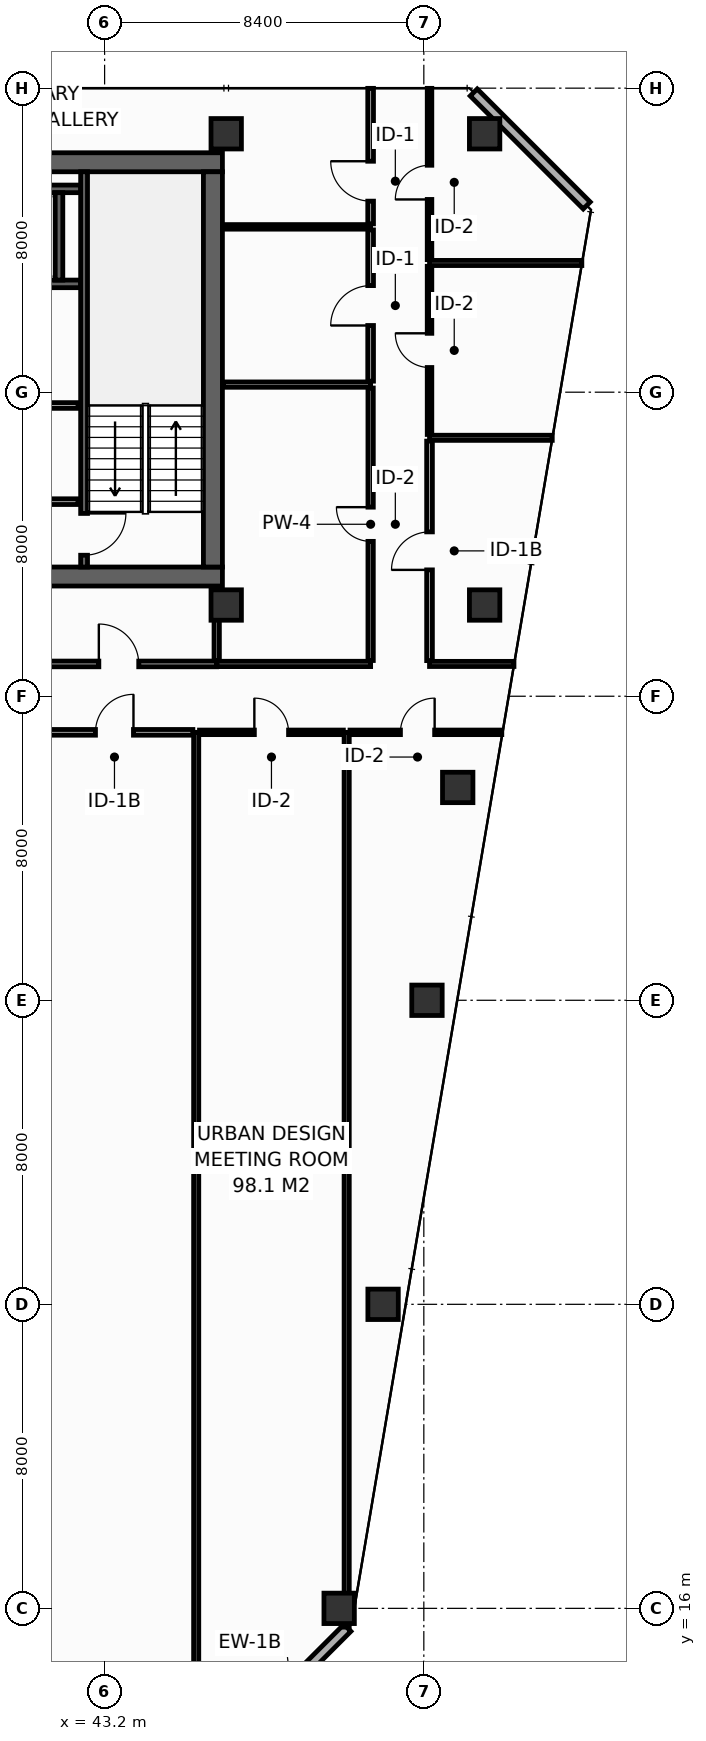
"""IFC4 building model, lengths in metres.
Left out: names, types, materials, properties, quantities, classifications, styles, units other than length and angle.
Written with IfcOpenShell. Run it as: python <this file> out.ifc"""

import sys

from ifc_helpers import new_model, si_unit, direction, frame, frame_2d, origin, origin_2d, place, context, subcontext, project, spatial, rectangle, hollow_rectangle, extrude, element, fill, save


model = new_model("IFC4")
c1 = context("Model", 3, precision=1e-05, world=origin(), true_north=direction((0.0, 1.0)))
c2 = subcontext(c1, "Body", "Model", "MODEL_VIEW")
j1 = project(units=[si_unit("LENGTHUNIT", "METRE"), si_unit("PLANEANGLEUNIT", "RADIAN")], contexts=[c1])
p1 = place(None, origin())
s1 = spatial("IfcSite", under=j1, at=p1, CompositionType="ELEMENT")
p2 = place(p1, origin())
s2 = spatial("IfcBuilding", under=s1, at=p2, CompositionType="ELEMENT")
p3 = place(p2, frame((0.0, 0.0, 201.8)))
s3 = spatial("IfcBuildingStorey", under=s2, at=p3, CompositionType="ELEMENT", Elevation=201.8)
p4 = place(p3, frame((13.6, 43.15, 0.0), z_axis=(0.0, 0.0, 1.0), x_axis=(1.0, 0.0, 0.0)))
e1 = element("IfcWall", 1, at=p4, inside=s3, PredefinedType="SHEAR", context=c2, shape_type="SweptSolid", body=[
    extrude(rectangle(XDim=32.7, YDim=0.5, at=frame_2d((16.35, 0.0))), origin(), (0.0, 0.0, 1.0), 3.55),
])
p5 = place(p4, frame((5.4, 0.0, 0.0)))
e2 = element("IfcOpeningElement", 2, at=p5, cuts=e1, PredefinedType="OPENING", context=c2, shape_type="SweptSolid", body=[
    extrude(rectangle(XDim=1.1, YDim=2.15, at=frame_2d((0.55, 1.075))), frame((0.0, 0.26, 0.0), z_axis=(0.0, -1.0, 0.0), x_axis=(1.0, 0.0, 0.0)), (0.0, 0.0, 1.0), 0.52),
])
p6 = place(p4, frame((25.6, 0.0, 0.0)))
e3 = element("IfcOpeningElement", 3, at=p6, cuts=e1, PredefinedType="OPENING", context=c2, shape_type="SweptSolid", body=[
    extrude(rectangle(XDim=1.1, YDim=2.15, at=frame_2d((0.55, 1.075))), frame((0.0, 0.26, 0.0), z_axis=(0.0, -1.0, 0.0), x_axis=(1.0, 0.0, 0.0)), (0.0, 0.0, 1.0), 0.52),
])
p7 = place(p3, frame((13.6, 54.05, 0.0), z_axis=(0.0, 0.0, 1.0), x_axis=(1.0, 0.0, 0.0)))
e4 = element("IfcWall", 4, at=p7, inside=s3, PredefinedType="SHEAR", context=c2, shape_type="SweptSolid", body=[
    extrude(rectangle(XDim=32.7, YDim=0.5, at=frame_2d((16.35, 0.0))), origin(), (0.0, 0.0, 1.0), 3.55),
])
p8 = place(p3, frame((46.05, 43.4, 0.0), z_axis=(0.0, 0.0, 1.0), x_axis=(0.0, 1.0, 0.0)))
e5 = element("IfcWall", 5, at=p8, inside=s3, PredefinedType="SHEAR", context=c2, shape_type="SweptSolid", body=[
    extrude(rectangle(XDim=10.4, YDim=0.5, at=frame_2d((5.2, 0.0))), origin(), (0.0, 0.0, 1.0), 3.55),
])
for number, where, z_axis, x_axis in (
    (6, (46.4, 54.8, 0.0), (0.0, 0.0, 1.0), (1.0, 0.0, 0.0)),
    (7, (53.2, 54.8, 0.0), (0.0, 0.0, 1.0), (1.0, 0.0, 0.0)),
    (8, (46.4, 42.4, 0.0), (0.0, 0.0, 1.0), (1.0, 0.0, 0.0)),
    (9, (53.2, 42.4, 0.0), (0.0, 0.0, 1.0), (1.0, 0.0, 0.0)),
    (10, (49.372, 16.0, 0.0), (0.0, 0.0, 1.0), (1.0, 0.0, 0.0)),
    (11, (50.528, 24.0, 0.0), (0.0, 0.0, 1.0), (1.0, 0.0, 0.0)),
    (12, (51.683, 32.0, 0.0), (0.0, 0.0, 1.0), (1.0, 0.0, 0.0)),
    (13, (52.492, 37.6, 0.0), (0.0, 0.0, 1.0), (1.0, 0.0, 0.0)),
):
    element("IfcColumn", number, at=place(p3, frame(where, z_axis=z_axis, x_axis=x_axis)), inside=s3, PredefinedType="COLUMN", context=c2, shape_type="SweptSolid", body=[
        extrude(hollow_rectangle(XDim=0.8, YDim=0.8, WallThickness=0.036, at=origin_2d()), origin(), (0.0, 0.0, 1.0), 3.8),
    ])
for number, where, z_axis, x_axis in (
    (14, (39.525, 50.85, 0.0), (0.0, 0.0, 1.0), (1.0, 0.0, 0.0)),
    (15, (39.525, 53.35, 0.0), (0.0, 0.0, 1.0), (1.0, 0.0, 0.0)),
):
    element("IfcWall", number, at=place(p3, frame(where, z_axis=z_axis, x_axis=x_axis)), inside=s3, PredefinedType="SHEAR", context=c2, shape_type="SweptSolid", body=[
        extrude(rectangle(XDim=3.045, YDim=0.2, at=frame_2d((1.522, 0.0))), origin(), (0.0, 0.0, 1.0), 3.55),
    ])
p9 = place(p3, frame((42.0, 50.95, 0.0), z_axis=(0.0, 0.0, 1.0), x_axis=(0.0, 1.0, 0.0)))
e16 = element("IfcWall", 16, at=p9, inside=s3, PredefinedType="SHEAR", context=c2, shape_type="SweptSolid", body=[
    extrude(rectangle(XDim=2.3, YDim=0.2, at=frame_2d((1.15, 0.0))), origin(), (0.0, 0.0, 1.0), 3.55),
])
p10 = place(p3, frame((42.66, 53.8, 0.0), z_axis=(0.0, 0.0, 1.0), x_axis=(0.0, -1.0, 0.0)))
e17 = element("IfcWall", 17, at=p10, inside=s3, PredefinedType="SHEAR", context=c2, shape_type="SweptSolid", body=[
    extrude(rectangle(XDim=10.4, YDim=0.18, at=frame_2d((5.2, 0.0))), origin(), (0.0, 0.0, 1.0), 3.55),
])
p11 = place(p10, frame((8.99, 0.0, 0.0)))
e18 = element("IfcOpeningElement", 18, at=p11, cuts=e17, PredefinedType="OPENING", context=c2, shape_type="SweptSolid", body=[
    extrude(rectangle(XDim=1.1, YDim=2.15, at=frame_2d((0.55, 1.075))), frame((0.0, 0.1, 0.0), z_axis=(0.0, -1.0, 0.0), x_axis=(1.0, 0.0, 0.0)), (0.0, 0.0, 1.0), 0.2),
])
p12 = place(p3, frame((33.95, 45.12, 0.0), z_axis=(0.0, 0.0, 1.0), x_axis=(1.0, 0.0, 0.0)))
e19 = element("IfcWall", 19, at=p12, inside=s3, PredefinedType="PARTITIONING", context=c2, shape_type="SweptSolid", body=[
    extrude(rectangle(XDim=8.55, YDim=0.15, at=frame_2d((4.275, 0.0))), origin(), (0.0, 0.0, 1.0), 3.55),
])
p13 = place(p12, frame((0.95, 0.0, 0.0)))
e20 = element("IfcOpeningElement", 20, at=p13, cuts=e19, PredefinedType="OPENING", context=c2, shape_type="SweptSolid", body=[
    extrude(rectangle(XDim=0.95, YDim=2.15, at=frame_2d((0.475, 1.075))), frame((0.0, 0.085, 0.0), z_axis=(0.0, -1.0, 0.0), x_axis=(1.0, 0.0, 0.0)), (0.0, 0.0, 1.0), 0.17),
])
p14 = place(p12, frame((3.8, 0.0, 0.0)))
e21 = element("IfcOpeningElement", 21, at=p14, cuts=e19, PredefinedType="OPENING", context=c2, shape_type="SweptSolid", body=[
    extrude(rectangle(XDim=0.95, YDim=2.15, at=frame_2d((0.475, 1.075))), frame((0.0, 0.085, 0.0), z_axis=(0.0, -1.0, 0.0), x_axis=(1.0, 0.0, 0.0)), (0.0, 0.0, 1.0), 0.17),
])
p15 = place(p12, frame((6.65, 0.0, 0.0)))
e22 = element("IfcOpeningElement", 22, at=p15, cuts=e19, PredefinedType="OPENING", context=c2, shape_type="SweptSolid", body=[
    extrude(rectangle(XDim=0.95, YDim=2.15, at=frame_2d((0.475, 1.075))), frame((0.0, 0.085, 0.0), z_axis=(0.0, -1.0, 0.0), x_axis=(1.0, 0.0, 0.0)), (0.0, 0.0, 1.0), 0.17),
])
p16 = place(p3, frame((33.95, 47.65, 0.0), z_axis=(0.0, 0.0, 1.0), x_axis=(1.0, 0.0, 0.0)))
e23 = element("IfcWall", 23, at=p16, inside=s3, PredefinedType="PARTITIONING", context=c2, shape_type="SweptSolid", body=[
    extrude(rectangle(XDim=8.55, YDim=0.15, at=frame_2d((4.275, 0.0))), origin(), (0.0, 0.0, 1.0), 3.55),
])
p17 = place(p3, frame((46.615, 12.513, 0.0), z_axis=(0.0, 0.0, 1.0), x_axis=(0.707135806771, 0.70707775441, 0.0)))
e24 = element("IfcWall", 24, at=p17, inside=s3, PredefinedType="STANDARD", context=c2, shape_type="SweptSolid", body=[
    extrude(rectangle(XDim=4.206, YDim=0.26, at=frame_2d((2.103, 0.0))), origin(), (0.0, 0.0, 1.0), 3.55),
])
p18 = place(p3, frame((55.887, 52.913, 0.0), z_axis=(0.0, 0.0, 1.0), x_axis=(-0.707106781187, 0.707106781187, 0.0)))
e25 = element("IfcWall", 25, at=p18, inside=s3, PredefinedType="STANDARD", context=c2, shape_type="SweptSolid", body=[
    extrude(rectangle(XDim=4.206, YDim=0.26, at=frame_2d((2.103, 0.0))), origin(), (0.0, 0.0, 1.0), 3.55),
])
p19 = place(p3, frame((46.15, 40.85, 0.0), z_axis=(0.0, 0.0, 1.0), x_axis=(1.0, 0.0, 0.0)))
e26 = element("IfcWall", 26, at=p19, inside=s3, PredefinedType="PARTITIONING", context=c2, shape_type="SweptSolid", body=[
    extrude(rectangle(XDim=4.05, YDim=0.14, at=frame_2d((2.025, 0.0))), origin(), (0.0, 0.0, 1.0), 3.55),
])
p20 = place(p3, frame((46.15, 40.94, 0.0), z_axis=(0.0, 0.0, 1.0), x_axis=(0.0, 1.0, 0.0)))
e27 = element("IfcWall", 27, at=p20, inside=s3, PredefinedType="PARTITIONING", context=c2, shape_type="SweptSolid", body=[
    extrude(rectangle(XDim=1.94, YDim=0.14, at=frame_2d((0.97, 0.0))), origin(), (0.0, 0.0, 1.0), 3.55),
])
p21 = place(p3, frame((46.32, 48.2, 0.0), z_axis=(0.0, 0.0, 1.0), x_axis=(1.0, 0.0, 0.0)))
e28 = element("IfcWall", 28, at=p21, inside=s3, PredefinedType="PARTITIONING", context=c2, shape_type="SweptSolid", body=[
    extrude(rectangle(XDim=3.88, YDim=0.14, at=frame_2d((1.94, 0.0))), origin(), (0.0, 0.0, 1.0), 3.55),
])
p22 = place(p3, frame((50.2, 40.94, 0.0), z_axis=(0.0, 0.0, 1.0), x_axis=(0.0, 1.0, 0.0)))
e29 = element("IfcWall", 29, at=p22, inside=s3, PredefinedType="PARTITIONING", context=c2, shape_type="SweptSolid", body=[
    extrude(rectangle(XDim=7.17, YDim=0.14, at=frame_2d((3.585, 0.0))), origin(), (0.0, 0.0, 1.0), 2.835),
])
p23 = place(p22, frame((3.135, 0.0, 0.0)))
e30 = element("IfcOpeningElement", 30, at=p23, cuts=e29, PredefinedType="OPENING", context=c2, shape_type="SweptSolid", body=[
    extrude(rectangle(XDim=0.9, YDim=2.1, at=frame_2d((0.45, 1.05))), frame((0.0, 0.08, 0.0), z_axis=(0.0, -1.0, 0.0), x_axis=(1.0, 0.0, 0.0)), (0.0, 0.0, 1.0), 0.16),
])
p24 = place(p3, frame((46.32, 52.35, 0.0), z_axis=(0.0, 0.0, 1.0), x_axis=(1.0, 0.0, 0.0)))
e31 = element("IfcWall", 31, at=p24, inside=s3, PredefinedType="PARTITIONING", context=c2, shape_type="SweptSolid", body=[
    extrude(rectangle(XDim=3.88, YDim=0.12, at=frame_2d((1.94, 0.0))), origin(), (0.0, 0.0, 1.0), 3.55),
])
p25 = place(p3, frame((50.2, 48.29, 0.0), z_axis=(0.0, 0.0, 1.0), x_axis=(0.0, 1.0, 0.0)))
e32 = element("IfcWall", 32, at=p25, inside=s3, PredefinedType="PARTITIONING", context=c2, shape_type="SweptSolid", body=[
    extrude(rectangle(XDim=3.98, YDim=0.15, at=frame_2d((1.99, 0.0))), origin(), (0.0, 0.0, 1.0), 3.55),
])
p26 = place(p25, frame((1.465, 0.0, 0.0)))
e33 = element("IfcOpeningElement", 33, at=p26, cuts=e32, PredefinedType="OPENING", context=c2, shape_type="SweptSolid", body=[
    extrude(rectangle(XDim=1.05, YDim=2.15, at=frame_2d((0.525, 1.075))), frame((0.0, 0.085, 0.0), z_axis=(0.0, -1.0, 0.0), x_axis=(1.0, 0.0, 0.0)), (0.0, 0.0, 1.0), 0.17),
])
p27 = place(p3, frame((50.2, 52.43, 0.0), z_axis=(0.0, 0.0, 1.0), x_axis=(0.0, 1.0, 0.0)))
e34 = element("IfcWall", 34, at=p27, inside=s3, PredefinedType="PARTITIONING", context=c2, shape_type="SweptSolid", body=[
    extrude(rectangle(XDim=3.565, YDim=0.15, at=frame_2d((1.783, 0.0))), origin(), (0.0, 0.0, 1.0), 2.935),
])
p28 = place(p27, frame((0.597, 0.0, 0.0)))
e35 = element("IfcOpeningElement", 35, at=p28, cuts=e34, PredefinedType="OPENING", context=c2, shape_type="SweptSolid", body=[
    extrude(rectangle(XDim=1.05, YDim=2.15, at=frame_2d((0.525, 1.075))), frame((0.0, 0.085, 0.0), z_axis=(0.0, -1.0, 0.0), x_axis=(1.0, 0.0, 0.0)), (0.0, 0.0, 1.0), 0.17),
])
p29 = place(p3, frame((51.75, 40.85, 0.0), z_axis=(0.0, 0.0, 1.0), x_axis=(1.0, 0.0, 0.0)))
e36 = element("IfcWall", 36, at=p29, inside=s3, PredefinedType="PARTITIONING", context=c2, shape_type="SweptSolid", body=[
    extrude(rectangle(XDim=2.222, YDim=0.135, at=frame_2d((1.111, 0.0))), origin(), (0.0, 0.0, 1.0), 3.035),
])
p30 = place(p3, frame((51.75, 46.8, 0.0), z_axis=(0.0, 0.0, 1.0), x_axis=(1.0, 0.0, 0.0)))
e37 = element("IfcWall", 37, at=p30, inside=s3, PredefinedType="PARTITIONING", context=c2, shape_type="SweptSolid", body=[
    extrude(rectangle(XDim=3.229, YDim=0.135, at=frame_2d((1.615, 0.0))), origin(), (0.0, 0.0, 1.0), 2.835),
])
p31 = place(p3, frame((51.75, 51.4, 0.0), z_axis=(0.0, 0.0, 1.0), x_axis=(1.0, 0.0, 0.0)))
e38 = element("IfcWall", 38, at=p31, inside=s3, PredefinedType="PARTITIONING", context=c2, shape_type="SweptSolid", body=[
    extrude(rectangle(XDim=4.008, YDim=0.135, at=frame_2d((2.004, 0.0))), origin(), (0.0, 0.0, 1.0), 2.835),
])
p32 = place(p3, frame((51.75, 40.938, 0.0), z_axis=(0.0, 0.0, 1.0), x_axis=(0.0, 1.0, 0.0)))
e39 = element("IfcWall", 39, at=p32, inside=s3, PredefinedType="PARTITIONING", context=c2, shape_type="SweptSolid", body=[
    extrude(rectangle(XDim=5.775, YDim=0.15, at=frame_2d((2.887, 0.0))), origin(), (0.0, 0.0, 1.0), 2.835),
])
p33 = place(p32, frame((2.387, 0.0, 0.0)))
e40 = element("IfcOpeningElement", 40, at=p33, cuts=e39, PredefinedType="OPENING", context=c2, shape_type="SweptSolid", body=[
    extrude(rectangle(XDim=1.0, YDim=2.15, at=frame_2d((0.5, 1.075))), frame((0.0, 0.085, 0.0), z_axis=(0.0, -1.0, 0.0), x_axis=(1.0, 0.0, 0.0)), (0.0, 0.0, 1.0), 0.17),
])
p34 = place(p3, frame((51.75, 46.887, 0.0), z_axis=(0.0, 0.0, 1.0), x_axis=(0.0, 1.0, 0.0)))
e41 = element("IfcWall", 41, at=p34, inside=s3, PredefinedType="PARTITIONING", context=c2, shape_type="SweptSolid", body=[
    extrude(rectangle(XDim=4.425, YDim=0.12, at=frame_2d((2.212, 0.0))), origin(), (0.0, 0.0, 1.0), 3.55),
])
p35 = place(p34, frame((1.762, 0.0, 0.0)))
e42 = element("IfcOpeningElement", 42, at=p35, cuts=e41, PredefinedType="OPENING", context=c2, shape_type="SweptSolid", body=[
    extrude(rectangle(XDim=0.9, YDim=2.1, at=frame_2d((0.45, 1.05))), frame((0.0, 0.07, 0.0), z_axis=(0.0, -1.0, 0.0), x_axis=(1.0, 0.0, 0.0)), (0.0, 0.0, 1.0), 0.14),
])
p36 = place(p3, frame((51.75, 51.488, 0.0), z_axis=(0.0, 0.0, 1.0), x_axis=(0.0, 1.0, 0.0)))
e43 = element("IfcWall", 43, at=p36, inside=s3, PredefinedType="PARTITIONING", context=c2, shape_type="SweptSolid", body=[
    extrude(rectangle(XDim=4.508, YDim=0.12, at=frame_2d((2.254, 0.0))), origin(), (0.0, 0.0, 1.0), 2.935),
])
p37 = place(p36, frame((1.584, 0.0, 0.0)))
e44 = element("IfcOpeningElement", 44, at=p37, cuts=e43, PredefinedType="OPENING", context=c2, shape_type="SweptSolid", body=[
    extrude(rectangle(XDim=0.9, YDim=2.1, at=frame_2d((0.45, 1.05))), frame((0.0, 0.07, 0.0), z_axis=(0.0, -1.0, 0.0), x_axis=(1.0, 0.0, 0.0)), (0.0, 0.0, 1.0), 0.14),
])
p38 = place(p3, frame((40.995, 40.85, 0.0), z_axis=(0.0, 0.0, 1.0), x_axis=(1.0, 0.0, 0.0)))
e45 = element("IfcWall", 45, at=p38, inside=s3, PredefinedType="PARTITIONING", context=c2, shape_type="SweptSolid", body=[
    extrude(rectangle(XDim=5.155, YDim=0.15, at=frame_2d((2.577, 0.0))), origin(), (0.0, 0.0, 1.0), 3.55),
])
p39 = place(p38, frame((2.053, 0.0, 0.0)))
e46 = element("IfcOpeningElement", 46, at=p39, cuts=e45, PredefinedType="OPENING", context=c2, shape_type="SweptSolid", body=[
    extrude(rectangle(XDim=1.05, YDim=2.15, at=frame_2d((0.525, 1.075))), frame((0.0, 0.085, 0.0), z_axis=(0.0, -1.0, 0.0), x_axis=(1.0, 0.0, 0.0)), (0.0, 0.0, 1.0), 0.17),
])
p40 = place(p3, frame((45.61, 12.405, 0.0), z_axis=(0.0, 0.0, 1.0), x_axis=(0.0, 1.0, 0.0)))
e47 = element("IfcWall", 47, at=p40, inside=s3, PredefinedType="PARTITIONING", context=c2, shape_type="SweptSolid", body=[
    extrude(rectangle(XDim=26.645, YDim=0.135, at=frame_2d((13.323, 0.0))), origin(), (0.0, 0.0, 1.0), 2.835),
])
p41 = place(p3, frame((49.57, 15.506, 0.0), z_axis=(0.0, 0.0, 1.0), x_axis=(0.0, 1.0, 0.0)))
e48 = element("IfcWall", 48, at=p41, inside=s3, PredefinedType="PARTITIONING", context=c2, shape_type="SweptSolid", body=[
    extrude(rectangle(XDim=23.544, YDim=0.135, at=frame_2d((11.772, 0.0))), origin(), (0.0, 0.0, 1.0), 2.835),
])
p42 = place(p3, frame((41.397, 39.05, 0.0), z_axis=(0.0, 0.0, 1.0), x_axis=(1.0, 0.0, 0.0)))
e49 = element("IfcWall", 49, at=p42, inside=s3, PredefinedType="PARTITIONING", context=c2, shape_type="SweptSolid", body=[
    extrude(rectangle(XDim=4.125, YDim=0.15, at=frame_2d((2.062, 0.0))), origin(), (0.0, 0.0, 1.0), 3.55),
])
p43 = place(p42, frame((1.562, 0.0, 0.0)))
e50 = element("IfcOpeningElement", 50, at=p43, cuts=e49, PredefinedType="OPENING", context=c2, shape_type="SweptSolid", body=[
    extrude(rectangle(XDim=1.0, YDim=2.15, at=frame_2d((0.5, 1.075))), frame((0.0, 0.085, 0.0), z_axis=(0.0, -1.0, 0.0), x_axis=(1.0, 0.0, 0.0)), (0.0, 0.0, 1.0), 0.17),
])
p44 = place(p3, frame((45.698, 39.05, 0.0), z_axis=(0.0, 0.0, 1.0), x_axis=(1.0, 0.0, 0.0)))
e51 = element("IfcWall", 51, at=p44, inside=s3, PredefinedType="PARTITIONING", context=c2, shape_type="SweptSolid", body=[
    extrude(rectangle(XDim=3.785, YDim=0.12, at=frame_2d((1.893, 0.0))), origin(), (0.0, 0.0, 1.0), 3.55),
])
p45 = place(p44, frame((1.443, 0.0, 0.0)))
e52 = element("IfcOpeningElement", 52, at=p45, cuts=e51, PredefinedType="OPENING", context=c2, shape_type="SweptSolid", body=[
    extrude(rectangle(XDim=0.9, YDim=2.1, at=frame_2d((0.45, 1.05))), frame((0.0, 0.07, 0.0), z_axis=(0.0, -1.0, 0.0), x_axis=(1.0, 0.0, 0.0)), (0.0, 0.0, 1.0), 0.14),
])
p46 = place(p3, frame((49.657, 39.05, 0.0), z_axis=(0.0, 0.0, 1.0), x_axis=(1.0, 0.0, 0.0)))
e53 = element("IfcWall", 53, at=p46, inside=s3, PredefinedType="PARTITIONING", context=c2, shape_type="SweptSolid", body=[
    extrude(rectangle(XDim=3.994, YDim=0.12, at=frame_2d((1.997, 0.0))), origin(), (0.0, 0.0, 1.0), 3.035),
])
p47 = place(p46, frame((1.327, 0.0, 0.0)))
e54 = element("IfcOpeningElement", 54, at=p47, cuts=e53, PredefinedType="OPENING", context=c2, shape_type="SweptSolid", body=[
    extrude(rectangle(XDim=0.9, YDim=2.1, at=frame_2d((0.45, 1.05))), frame((0.0, 0.07, 0.0), z_axis=(0.0, -1.0, 0.0), x_axis=(1.0, 0.0, 0.0)), (0.0, 0.0, 1.0), 0.14),
])
p48 = place(p11, origin())
e55 = element("IfcDoor", 55, at=p48, inside=s3, OperationType="SINGLE_SWING_LEFT", PredefinedType="DOOR", context=c2, shape_type="SweptSolid", body=[
    extrude(rectangle(XDim=1.1, YDim=2.15, at=frame_2d((0.55, 1.075))), frame((0.0, 0.025, 0.0), z_axis=(0.0, -1.0, 0.0), x_axis=(1.0, 0.0, 0.0)), (0.0, 0.0, 1.0), 0.05),
])
fill(e18, e55)
p49 = place(p23, origin())
e56 = element("IfcDoor", 56, at=p49, inside=s3, OperationType="SINGLE_SWING_RIGHT", PredefinedType="DOOR", context=c2, shape_type="SweptSolid", body=[
    extrude(rectangle(XDim=0.9, YDim=2.1, at=frame_2d((0.45, 1.05))), frame((0.0, 0.025, 0.0), z_axis=(0.0, -1.0, 0.0), x_axis=(1.0, 0.0, 0.0)), (0.0, 0.0, 1.0), 0.05),
])
fill(e30, e56)
p50 = place(p26, origin())
e57 = element("IfcDoor", 57, at=p50, inside=s3, OperationType="SINGLE_SWING_LEFT", PredefinedType="DOOR", context=c2, shape_type="SweptSolid", body=[
    extrude(rectangle(XDim=1.05, YDim=2.15, at=frame_2d((0.525, 1.075))), frame((0.0, 0.025, 0.0), z_axis=(0.0, -1.0, 0.0), x_axis=(1.0, 0.0, 0.0)), (0.0, 0.0, 1.0), 0.05),
])
fill(e33, e57)
p51 = place(p28, origin())
e58 = element("IfcDoor", 58, at=p51, inside=s3, OperationType="SINGLE_SWING_RIGHT", PredefinedType="DOOR", context=c2, shape_type="SweptSolid", body=[
    extrude(rectangle(XDim=1.05, YDim=2.15, at=frame_2d((0.525, 1.075))), frame((0.0, 0.025, 0.0), z_axis=(0.0, -1.0, 0.0), x_axis=(1.0, 0.0, 0.0)), (0.0, 0.0, 1.0), 0.05),
])
fill(e35, e58)
p52 = place(p33, origin())
e59 = element("IfcDoor", 59, at=p52, inside=s3, OperationType="SINGLE_SWING_LEFT", PredefinedType="DOOR", context=c2, shape_type="SweptSolid", body=[
    extrude(rectangle(XDim=1.0, YDim=2.15, at=frame_2d((0.5, 1.075))), frame((0.0, 0.025, 0.0), z_axis=(0.0, -1.0, 0.0), x_axis=(1.0, 0.0, 0.0)), (0.0, 0.0, 1.0), 0.05),
])
fill(e40, e59)
p53 = place(p35, origin())
e60 = element("IfcDoor", 60, at=p53, inside=s3, OperationType="SINGLE_SWING_RIGHT", PredefinedType="DOOR", context=c2, shape_type="SweptSolid", body=[
    extrude(rectangle(XDim=0.9, YDim=2.1, at=frame_2d((0.45, 1.05))), frame((0.0, 0.025, 0.0), z_axis=(0.0, -1.0, 0.0), x_axis=(1.0, 0.0, 0.0)), (0.0, 0.0, 1.0), 0.05),
])
fill(e42, e60)
p54 = place(p37, origin())
e61 = element("IfcDoor", 61, at=p54, inside=s3, OperationType="SINGLE_SWING_LEFT", PredefinedType="DOOR", context=c2, shape_type="SweptSolid", body=[
    extrude(rectangle(XDim=0.9, YDim=2.1, at=frame_2d((0.45, 1.05))), frame((0.0, 0.025, 0.0), z_axis=(0.0, -1.0, 0.0), x_axis=(1.0, 0.0, 0.0)), (0.0, 0.0, 1.0), 0.05),
])
fill(e44, e61)
p55 = place(p39, origin())
e62 = element("IfcDoor", 62, at=p55, inside=s3, OperationType="SINGLE_SWING_LEFT", PredefinedType="DOOR", context=c2, shape_type="SweptSolid", body=[
    extrude(rectangle(XDim=1.05, YDim=2.15, at=frame_2d((0.525, 1.075))), frame((0.0, 0.025, 0.0), z_axis=(0.0, -1.0, 0.0), x_axis=(1.0, 0.0, 0.0)), (0.0, 0.0, 1.0), 0.05),
])
fill(e46, e62)
p56 = place(p43, origin())
e63 = element("IfcDoor", 63, at=p56, inside=s3, OperationType="SINGLE_SWING_RIGHT", PredefinedType="DOOR", context=c2, shape_type="SweptSolid", body=[
    extrude(rectangle(XDim=1.0, YDim=2.15, at=frame_2d((0.5, 1.075))), frame((0.0, 0.025, 0.0), z_axis=(0.0, -1.0, 0.0), x_axis=(1.0, 0.0, 0.0)), (0.0, 0.0, 1.0), 0.05),
])
fill(e50, e63)
p57 = place(p45, origin())
e64 = element("IfcDoor", 64, at=p57, inside=s3, OperationType="SINGLE_SWING_LEFT", PredefinedType="DOOR", context=c2, shape_type="SweptSolid", body=[
    extrude(rectangle(XDim=0.9, YDim=2.1, at=frame_2d((0.45, 1.05))), frame((0.0, 0.025, 0.0), z_axis=(0.0, -1.0, 0.0), x_axis=(1.0, 0.0, 0.0)), (0.0, 0.0, 1.0), 0.05),
])
fill(e52, e64)
p58 = place(p47, origin())
e65 = element("IfcDoor", 65, at=p58, inside=s3, OperationType="SINGLE_SWING_RIGHT", PredefinedType="DOOR", context=c2, shape_type="SweptSolid", body=[
    extrude(rectangle(XDim=0.9, YDim=2.1, at=frame_2d((0.45, 1.05))), frame((0.0, 0.025, 0.0), z_axis=(0.0, -1.0, 0.0), x_axis=(1.0, 0.0, 0.0)), (0.0, 0.0, 1.0), 0.05),
])
fill(e54, e65)
save(model, sys.argv[1])
